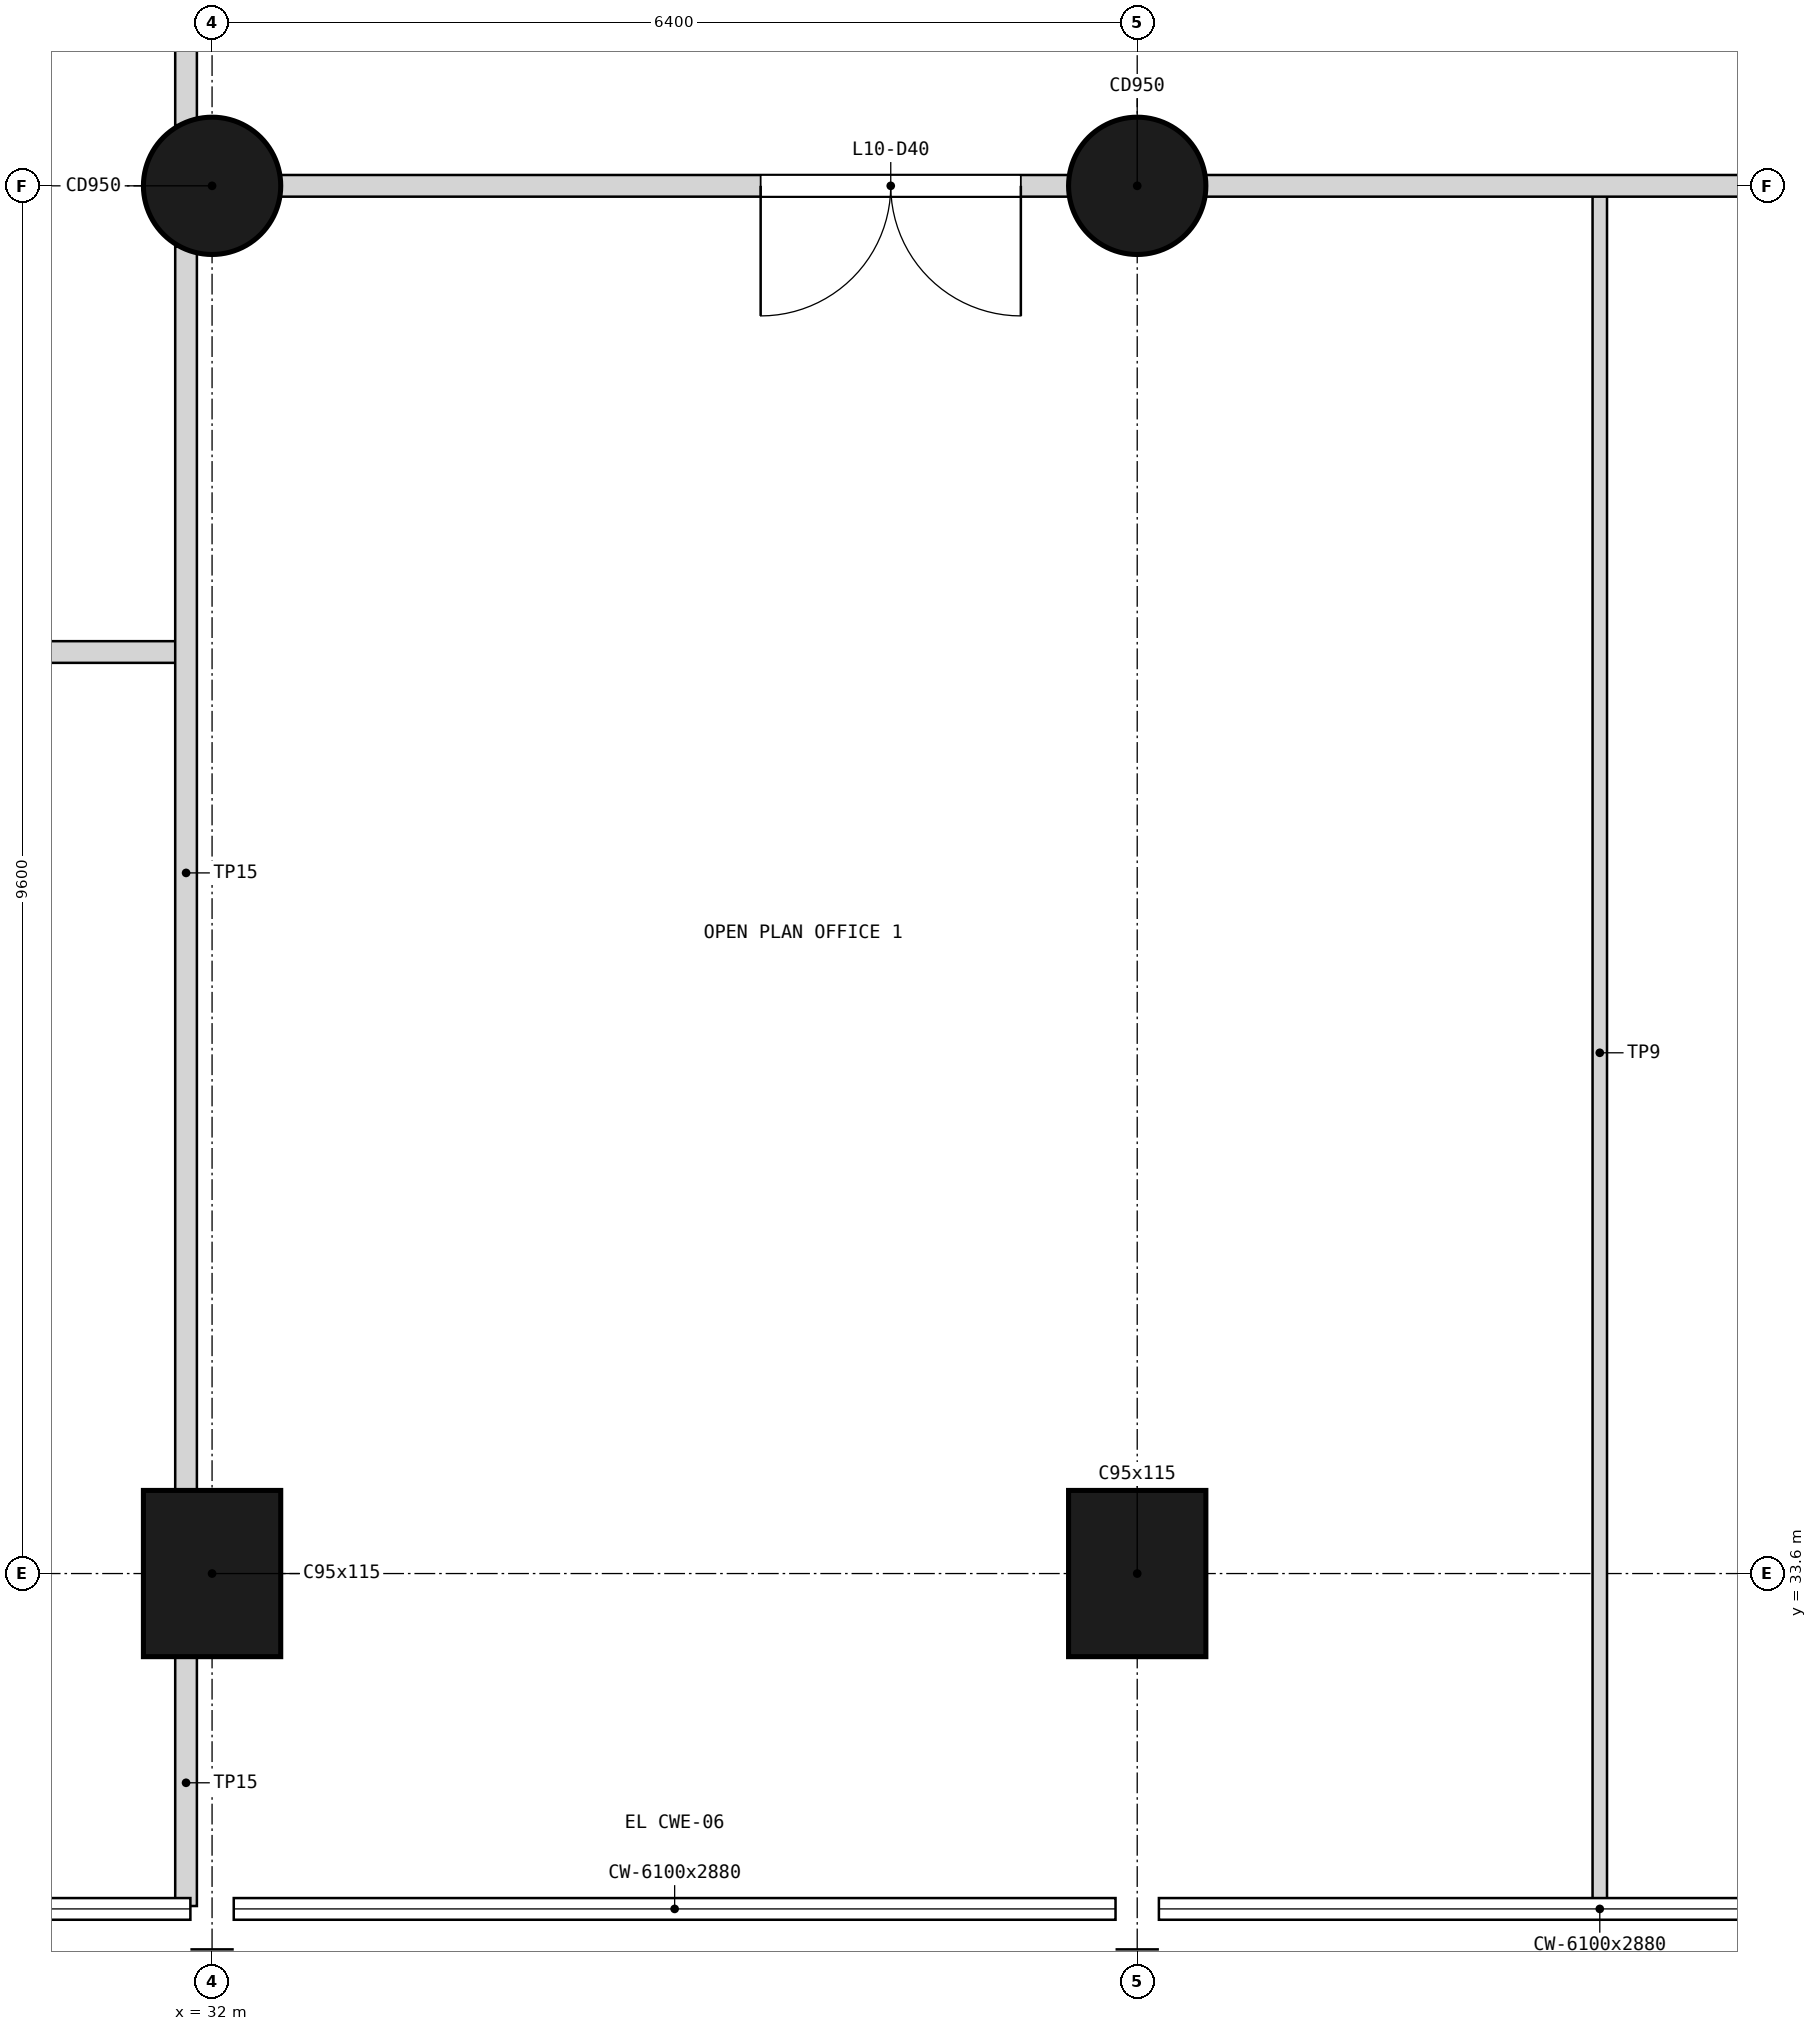
"""IFC4 building model, lengths in metres.
Left out: names, types, materials, properties, quantities, classifications, styles, units other than length and angle.
Written with IfcOpenShell. Run it as: python <this file> out.ifc"""

import sys

from ifc_helpers import new_model, si_unit, direction, frame, frame_2d, origin, origin_2d, place, context, subcontext, project, spatial, rectangle, circle, extrude, element, fill, save


model = new_model("IFC4")
c1 = context("Model", 3, precision=1e-05, world=origin(), true_north=direction((0.0, 1.0)))
c2 = subcontext(c1, "Body", "Model", "MODEL_VIEW")
j1 = project(units=[si_unit("LENGTHUNIT", "METRE"), si_unit("PLANEANGLEUNIT", "RADIAN")], contexts=[c1])
p1 = place(None, origin())
s1 = spatial("IfcSite", under=j1, at=p1, CompositionType="ELEMENT")
p2 = place(p1, origin())
s2 = spatial("IfcBuilding", under=s1, at=p2, CompositionType="ELEMENT")
p3 = place(p2, frame((0.0, 0.0, 40.5)))
s3 = spatial("IfcBuildingStorey", under=s2, at=p3, CompositionType="ELEMENT", Elevation=40.5)
p4 = place(p3, frame((32.0, 33.6, 0.0), z_axis=(0.0, 0.0, 1.0), x_axis=(1.0, 0.0, 0.0)))
e1 = element("IfcColumn", 1, at=p4, inside=s3, PredefinedType="COLUMN", context=c2, shape_type="SweptSolid", body=[
    extrude(rectangle(XDim=0.95, YDim=1.15, at=origin_2d()), origin(), (0.0, 0.0, 1.0), 3.9),
])
p5 = place(p3, frame((32.0, 43.2, 0.0), z_axis=(0.0, 0.0, 1.0), x_axis=(1.0, 0.0, 0.0)))
e2 = element("IfcColumn", 2, at=p5, inside=s3, PredefinedType="COLUMN", context=c2, shape_type="SweptSolid", body=[
    extrude(circle(Radius=0.475, at=origin_2d()), origin(), (0.0, 0.0, 1.0), 3.9),
])
p6 = place(p3, frame((38.4, 33.6, 0.0), z_axis=(0.0, 0.0, 1.0), x_axis=(1.0, 0.0, 0.0)))
e3 = element("IfcColumn", 3, at=p6, inside=s3, PredefinedType="COLUMN", context=c2, shape_type="SweptSolid", body=[
    extrude(rectangle(XDim=0.95, YDim=1.15, at=origin_2d()), origin(), (0.0, 0.0, 1.0), 3.9),
])
p7 = place(p3, frame((38.4, 43.2, 0.0), z_axis=(0.0, 0.0, 1.0), x_axis=(1.0, 0.0, 0.0)))
e4 = element("IfcColumn", 4, at=p7, inside=s3, PredefinedType="COLUMN", context=c2, shape_type="SweptSolid", body=[
    extrude(circle(Radius=0.475, at=origin_2d()), origin(), (0.0, 0.0, 1.0), 3.9),
])
p8 = place(p3, frame((41.6, 31.3, 0.0), z_axis=(0.0, 0.0, 1.0), x_axis=(0.0, 1.0, 0.0)))
e5 = element("IfcWall", 5, at=p8, inside=s3, PredefinedType="PARTITIONING", context=c2, shape_type="SweptSolid", body=[
    extrude(rectangle(XDim=11.9, YDim=0.1, at=frame_2d((5.95, 0.0))), origin(), (0.0, 0.0, 1.0), 3.08),
])
p9 = place(p3, frame((31.82, 43.2, 0.0), z_axis=(0.0, 0.0, 1.0), x_axis=(1.0, 0.0, 0.0)))
e6 = element("IfcWall", 6, at=p9, inside=s3, PredefinedType="PARTITIONING", context=c2, shape_type="SweptSolid", body=[
    extrude(rectangle(XDim=25.96, YDim=0.15, at=frame_2d((12.98, 0.0))), origin(), (0.0, 0.0, 1.0), 2.88),
])
p10 = place(p9, frame((3.975, 0.0, 0.0)))
e7 = element("IfcOpeningElement", 7, at=p10, cuts=e6, PredefinedType="OPENING", context=c2, shape_type="SweptSolid", body=[
    extrude(rectangle(XDim=1.8, YDim=2.1, at=frame_2d((0.9, 1.05))), frame((0.0, 0.085, 0.0), z_axis=(0.0, -1.0, 0.0), x_axis=(1.0, 0.0, 0.0)), (0.0, 0.0, 1.0), 0.17),
])
p11 = place(p9, frame((13.78, 0.0, 0.0)))
e8 = element("IfcOpeningElement", 8, at=p11, cuts=e6, PredefinedType="OPENING", context=c2, shape_type="SweptSolid", body=[
    extrude(rectangle(XDim=1.8, YDim=2.1, at=frame_2d((0.9, 1.05))), frame((0.0, 0.085, 0.0), z_axis=(0.0, -1.0, 0.0), x_axis=(1.0, 0.0, 0.0)), (0.0, 0.0, 1.0), 0.17),
])
p12 = place(p9, frame((17.38, 0.0, 0.0)))
e9 = element("IfcOpeningElement", 9, at=p12, cuts=e6, PredefinedType="OPENING", context=c2, shape_type="SweptSolid", body=[
    extrude(rectangle(XDim=1.0, YDim=2.1, at=frame_2d((0.5, 1.05))), frame((0.0, 0.085, 0.0), z_axis=(0.0, -1.0, 0.0), x_axis=(1.0, 0.0, 0.0)), (0.0, 0.0, 1.0), 0.17),
])
p13 = place(p3, frame((25.85, 39.975, 0.0), z_axis=(0.0, 0.0, 1.0), x_axis=(1.0, 0.0, 0.0)))
e10 = element("IfcWall", 10, at=p13, inside=s3, PredefinedType="PARTITIONING", context=c2, shape_type="SweptSolid", body=[
    extrude(rectangle(XDim=5.97, YDim=0.15, at=frame_2d((2.985, 0.0))), origin(), (0.0, 0.0, 1.0), 3.68),
])
p14 = place(p13, frame((2.45, 0.0, 0.0)))
e11 = element("IfcOpeningElement", 11, at=p14, cuts=e10, PredefinedType="OPENING", context=c2, shape_type="SweptSolid", body=[
    extrude(rectangle(XDim=1.0, YDim=2.1, at=frame_2d((0.5, 1.05))), frame((0.0, 0.085, 0.0), z_axis=(0.0, -1.0, 0.0), x_axis=(1.0, 0.0, 0.0)), (0.0, 0.0, 1.0), 0.17),
])
p15 = place(p3, frame((31.82, 31.3, 0.0), z_axis=(0.0, 0.0, 1.0), x_axis=(0.0, 1.0, 0.0)))
e12 = element("IfcWall", 12, at=p15, inside=s3, PredefinedType="PARTITIONING", context=c2, shape_type="SweptSolid", body=[
    extrude(rectangle(XDim=1.745, YDim=0.15, at=frame_2d((0.873, 0.0))), origin(), (0.0, 0.0, 1.0), 2.78),
])
p16 = place(p3, frame((31.82, 34.155, 0.0), z_axis=(0.0, 0.0, 1.0), x_axis=(0.0, 1.0, 0.0)))
e13 = element("IfcWall", 13, at=p16, inside=s3, PredefinedType="PARTITIONING", context=c2, shape_type="SweptSolid", body=[
    extrude(rectangle(XDim=8.625, YDim=0.15, at=frame_2d((4.313, 0.0))), origin(), (0.0, 0.0, 1.0), 2.78),
])
p17 = place(p3, frame((31.82, 43.62, 0.0), z_axis=(0.0, 0.0, 1.0), x_axis=(0.0, 1.0, 0.0)))
e14 = element("IfcWall", 14, at=p17, inside=s3, PredefinedType="PARTITIONING", context=c2, shape_type="SweptSolid", body=[
    extrude(rectangle(XDim=3.405, YDim=0.15, at=frame_2d((1.703, 0.0))), origin(), (0.0, 0.0, 1.0), 2.78),
])
p18 = place(p10, frame((1.8, 0.0, 0.0), z_axis=(0.0, 0.0, 1.0), x_axis=(-1.0, 0.0, 0.0)))
e15 = element("IfcDoor", 15, at=p18, inside=s3, OperationType="DOUBLE_DOOR_SINGLE_SWING", PredefinedType="DOOR", context=c2, shape_type="SweptSolid", body=[
    extrude(rectangle(XDim=1.8, YDim=2.1, at=frame_2d((0.9, 1.05))), frame((0.0, 0.025, 0.0), z_axis=(0.0, -1.0, 0.0), x_axis=(1.0, 0.0, 0.0)), (0.0, 0.0, 1.0), 0.05),
])
fill(e7, e15)
save(model, sys.argv[1])
